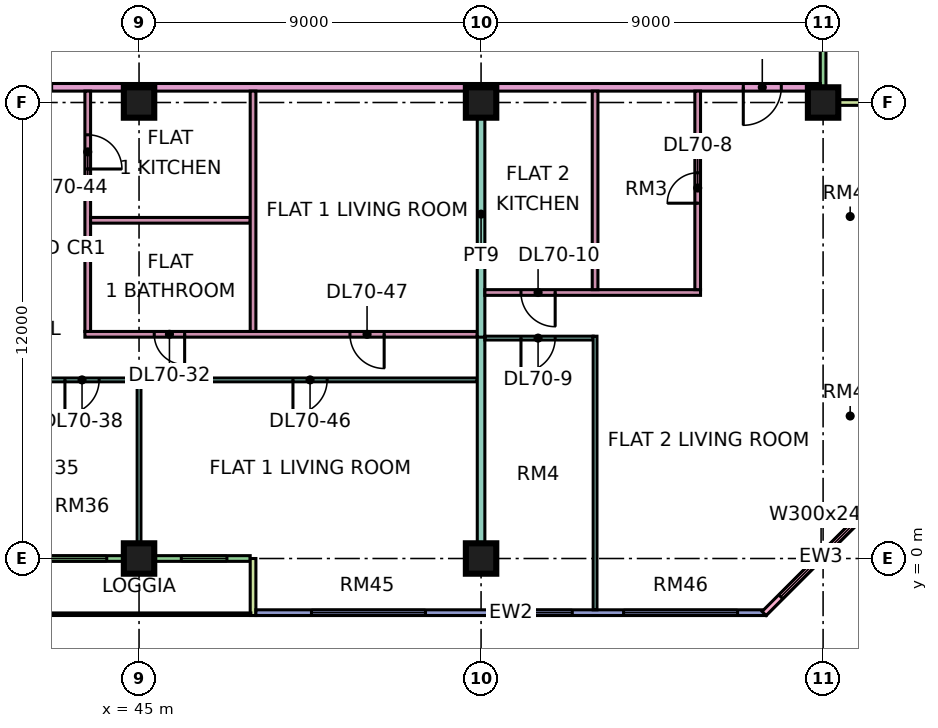
"""IFC4 building model, lengths in metres.
Left out: names, types, materials, properties, quantities, classifications, styles, units other than length and angle.
Written with IfcOpenShell. Run it as: python <this file> out.ifc"""

import sys

from ifc_helpers import new_model, si_unit, direction, frame, frame_2d, origin, origin_2d, place, context, subcontext, project, spatial, rectangle, extrude, element, fill, save


model = new_model("IFC4")
c1 = context("Model", 3, precision=1e-05, world=origin(), true_north=direction((0.0, 1.0)))
c2 = subcontext(c1, "Body", "Model", "MODEL_VIEW")
j1 = project(units=[si_unit("LENGTHUNIT", "METRE"), si_unit("PLANEANGLEUNIT", "RADIAN")], contexts=[c1])
p1 = place(None, origin())
s1 = spatial("IfcSite", under=j1, at=p1, CompositionType="ELEMENT")
p2 = place(p1, origin())
s2 = spatial("IfcBuilding", under=s1, at=p2, CompositionType="ELEMENT")
p3 = place(p2, frame((0.0, 0.0, 299.65)))
s3 = spatial("IfcBuildingStorey", under=s2, at=p3, CompositionType="ELEMENT", Elevation=299.65)
for number, where, z_axis, x_axis in (
    (1, (45.0, 0.0, 0.0), (0.0, 0.0, 1.0), (1.0, 0.0, 0.0)),
    (2, (45.0, 12.0, 0.0), (0.0, 0.0, 1.0), (1.0, 0.0, 0.0)),
    (3, (54.0, 0.0, 0.0), (0.0, 0.0, 1.0), (1.0, 0.0, 0.0)),
    (4, (54.0, 12.0, 0.0), (0.0, 0.0, 1.0), (1.0, 0.0, 0.0)),
    (5, (63.0, 12.0, 0.0), (0.0, 0.0, 1.0), (1.0, 0.0, 0.0)),
):
    element("IfcColumn", number, at=place(p3, frame(where, z_axis=z_axis, x_axis=x_axis)), inside=s3, PredefinedType="COLUMN", context=c2, shape_type="SweptSolid", body=[
        extrude(rectangle(XDim=0.8, YDim=0.8, at=origin_2d()), origin(), (0.0, 0.0, 1.0), 3.75),
    ])
p4 = place(p3, frame((36.075, 0.0, 0.0), z_axis=(0.0, 0.0, 1.0), x_axis=(1.0, 0.0, 0.0)))
e6 = element("IfcWall", 6, at=p4, inside=s3, PredefinedType="SOLIDWALL", context=c2, shape_type="SweptSolid", body=[
    extrude(rectangle(XDim=11.85, YDim=0.15, at=frame_2d((5.925, 0.0))), origin(), (0.0, 0.0, 1.0), 3.35),
])
p5 = place(p4, frame((0.775, 0.0, 0.45)))
e7 = element("IfcOpeningElement", 7, at=p5, cuts=e6, PredefinedType="OPENING", context=c2, shape_type="SweptSolid", body=[
    extrude(rectangle(XDim=1.8, YDim=2.4, at=frame_2d((0.9, 1.2))), frame((0.0, 0.085, 0.0), z_axis=(0.0, -1.0, 0.0), x_axis=(1.0, 0.0, 0.0)), (0.0, 0.0, 1.0), 0.17),
])
p6 = place(p4, frame((3.525, 0.0, 0.0)))
e8 = element("IfcOpeningElement", 8, at=p6, cuts=e6, PredefinedType="OPENING", context=c2, shape_type="SweptSolid", body=[
    extrude(rectangle(XDim=1.8, YDim=2.4, at=frame_2d((0.9, 1.2))), frame((0.0, 0.085, 0.0), z_axis=(0.0, -1.0, 0.0), x_axis=(1.0, 0.0, 0.0)), (0.0, 0.0, 1.0), 0.17),
])
p7 = place(p4, frame((6.275, 0.0, 0.45)))
e9 = element("IfcOpeningElement", 9, at=p7, cuts=e6, PredefinedType="OPENING", context=c2, shape_type="SweptSolid", body=[
    extrude(rectangle(XDim=1.8, YDim=2.4, at=frame_2d((0.9, 1.2))), frame((0.0, 0.085, 0.0), z_axis=(0.0, -1.0, 0.0), x_axis=(1.0, 0.0, 0.0)), (0.0, 0.0, 1.0), 0.17),
])
p8 = place(p4, frame((10.038, 0.0, 0.45)))
e10 = element("IfcOpeningElement", 10, at=p8, cuts=e6, PredefinedType="OPENING", context=c2, shape_type="SweptSolid", body=[
    extrude(rectangle(XDim=1.2, YDim=2.4, at=frame_2d((0.6, 1.2))), frame((0.0, 0.085, 0.0), z_axis=(0.0, -1.0, 0.0), x_axis=(1.0, 0.0, 0.0)), (0.0, 0.0, 1.0), 0.17),
])
p9 = place(p3, frame((48.0, -1.5, 0.0), z_axis=(0.0, 0.0, 1.0), x_axis=(0.0, 1.0, 0.0)))
e11 = element("IfcWall", 11, at=p9, inside=s3, PredefinedType="SOLIDWALL", context=c2, shape_type="SweptSolid", body=[
    extrude(rectangle(XDim=1.5, YDim=0.15, at=frame_2d((0.75, 0.0))), origin(), (0.0, 0.0, 1.0), 3.35),
])
p10 = place(p3, frame((48.075, -1.425, 0.0), z_axis=(0.0, 0.0, 1.0), x_axis=(1.0, 0.0, 0.0)))
e12 = element("IfcWall", 12, at=p10, inside=s3, PredefinedType="SOLIDWALL", context=c2, shape_type="SweptSolid", body=[
    extrude(rectangle(XDim=13.425, YDim=0.15, at=frame_2d((6.712, 0.0))), origin(), (0.0, 0.0, 1.0), 3.35),
])
p11 = place(p10, frame((1.462, 0.0, 0.45)))
e13 = element("IfcOpeningElement", 13, at=p11, cuts=e12, PredefinedType="OPENING", context=c2, shape_type="SweptSolid", body=[
    extrude(rectangle(XDim=3.0, YDim=2.4, at=frame_2d((1.5, 1.2))), frame((0.0, 0.085, 0.0), z_axis=(0.0, -1.0, 0.0), x_axis=(1.0, 0.0, 0.0)), (0.0, 0.0, 1.0), 0.17),
])
p12 = place(p10, frame((6.525, 0.0, 0.45)))
e14 = element("IfcOpeningElement", 14, at=p12, cuts=e12, PredefinedType="OPENING", context=c2, shape_type="SweptSolid", body=[
    extrude(rectangle(XDim=1.8, YDim=2.4, at=frame_2d((0.9, 1.2))), frame((0.0, 0.085, 0.0), z_axis=(0.0, -1.0, 0.0), x_axis=(1.0, 0.0, 0.0)), (0.0, 0.0, 1.0), 0.17),
])
p13 = place(p10, frame((9.675, 0.0, 0.45)))
e15 = element("IfcOpeningElement", 15, at=p13, cuts=e12, PredefinedType="OPENING", context=c2, shape_type="SweptSolid", body=[
    extrude(rectangle(XDim=3.0, YDim=2.4, at=frame_2d((1.5, 1.2))), frame((0.0, 0.085, 0.0), z_axis=(0.0, -1.0, 0.0), x_axis=(1.0, 0.0, 0.0)), (0.0, 0.0, 1.0), 0.17),
])
p14 = place(p3, frame((61.447, -1.447, 0.0), z_axis=(0.0, 0.0, 1.0), x_axis=(0.707106781187, 0.707106781187, 0.0)))
e16 = element("IfcWall", 16, at=p14, inside=s3, PredefinedType="SOLIDWALL", context=c2, shape_type="SweptSolid", body=[
    extrude(rectangle(XDim=4.243, YDim=0.15, at=frame_2d((2.121, 0.0))), origin(), (0.0, 0.0, 1.0), 3.35),
])
p15 = place(p14, frame((0.621, 0.0, 0.45)))
e17 = element("IfcOpeningElement", 17, at=p15, cuts=e16, PredefinedType="OPENING", context=c2, shape_type="SweptSolid", body=[
    extrude(rectangle(XDim=3.0, YDim=2.4, at=frame_2d((1.5, 1.2))), frame((0.0, 0.085, 0.0), z_axis=(0.0, -1.0, 0.0), x_axis=(1.0, 0.0, 0.0)), (0.0, 0.0, 1.0), 0.17),
])
p16 = place(p3, frame((63.0, 12.075, 0.0), z_axis=(0.0, 0.0, 1.0), x_axis=(0.0, 1.0, 0.0)))
e18 = element("IfcWall", 18, at=p16, inside=s3, PredefinedType="SOLIDWALL", context=c2, shape_type="SweptSolid", body=[
    extrude(rectangle(XDim=10.35, YDim=0.15, at=frame_2d((5.175, 0.0))), origin(), (0.0, 0.0, 1.0), 3.35),
])
p17 = place(p16, frame((6.038, 0.0, 0.0)))
e19 = element("IfcOpeningElement", 19, at=p17, cuts=e18, PredefinedType="OPENING", context=c2, shape_type="SweptSolid", body=[
    extrude(rectangle(XDim=1.8, YDim=2.4, at=frame_2d((0.9, 1.2))), frame((0.0, 0.085, 0.0), z_axis=(0.0, -1.0, 0.0), x_axis=(1.0, 0.0, 0.0)), (0.0, 0.0, 1.0), 0.17),
])
p18 = place(p3, frame((64.5, 12.0, 0.0), z_axis=(0.0, 0.0, 1.0), x_axis=(-1.0, 0.0, 0.0)))
e20 = element("IfcWall", 20, at=p18, inside=s3, PredefinedType="SOLIDWALL", context=c2, shape_type="SweptSolid", body=[
    extrude(rectangle(XDim=1.5, YDim=0.15, at=frame_2d((0.75, 0.0))), origin(), (0.0, 0.0, 1.0), 3.35),
])
p19 = place(p3, frame((33.05, 4.7, 0.0), z_axis=(0.0, 0.0, 1.0), x_axis=(1.0, 0.0, 0.0)))
e21 = element("IfcWall", 21, at=p19, inside=s3, PredefinedType="PARTITIONING", context=c2, shape_type="SweptSolid", body=[
    extrude(rectangle(XDim=20.85, YDim=0.1, at=frame_2d((10.425, 0.0))), origin(), (0.0, 0.0, 1.0), 3.35),
])
p20 = place(p19, frame((1.0, 0.0, 0.0)))
e22 = element("IfcOpeningElement", 22, at=p20, cuts=e21, PredefinedType="OPENING", context=c2, shape_type="SweptSolid", body=[
    extrude(rectangle(XDim=0.9, YDim=2.1, at=frame_2d((0.45, 1.05))), frame((0.0, 0.06, 0.0), z_axis=(0.0, -1.0, 0.0), x_axis=(1.0, 0.0, 0.0)), (0.0, 0.0, 1.0), 0.12),
])
p21 = place(p19, frame((4.0, 0.0, 0.0)))
e23 = element("IfcOpeningElement", 23, at=p21, cuts=e21, PredefinedType="OPENING", context=c2, shape_type="SweptSolid", body=[
    extrude(rectangle(XDim=0.9, YDim=2.1, at=frame_2d((0.45, 1.05))), frame((0.0, 0.06, 0.0), z_axis=(0.0, -1.0, 0.0), x_axis=(1.0, 0.0, 0.0)), (0.0, 0.0, 1.0), 0.12),
])
p22 = place(p19, frame((7.0, 0.0, 0.0)))
e24 = element("IfcOpeningElement", 24, at=p22, cuts=e21, PredefinedType="OPENING", context=c2, shape_type="SweptSolid", body=[
    extrude(rectangle(XDim=0.9, YDim=2.1, at=frame_2d((0.45, 1.05))), frame((0.0, 0.06, 0.0), z_axis=(0.0, -1.0, 0.0), x_axis=(1.0, 0.0, 0.0)), (0.0, 0.0, 1.0), 0.12),
])
p23 = place(p19, frame((10.0, 0.0, 0.0)))
e25 = element("IfcOpeningElement", 25, at=p23, cuts=e21, PredefinedType="OPENING", context=c2, shape_type="SweptSolid", body=[
    extrude(rectangle(XDim=0.9, YDim=2.1, at=frame_2d((0.45, 1.05))), frame((0.0, 0.06, 0.0), z_axis=(0.0, -1.0, 0.0), x_axis=(1.0, 0.0, 0.0)), (0.0, 0.0, 1.0), 0.12),
])
p24 = place(p19, frame((16.0, 0.0, 0.0)))
e26 = element("IfcOpeningElement", 26, at=p24, cuts=e21, PredefinedType="OPENING", context=c2, shape_type="SweptSolid", body=[
    extrude(rectangle(XDim=0.9, YDim=2.1, at=frame_2d((0.45, 1.05))), frame((0.0, 0.06, 0.0), z_axis=(0.0, -1.0, 0.0), x_axis=(1.0, 0.0, 0.0)), (0.0, 0.0, 1.0), 0.12),
])
p25 = place(p3, frame((40.65, 12.4, 0.0), z_axis=(0.0, 0.0, 1.0), x_axis=(1.0, 0.0, 0.0)))
e27 = element("IfcWall", 27, at=p25, inside=s3, PredefinedType="PARTITIONING", context=c2, shape_type="SweptSolid", body=[
    extrude(rectangle(XDim=22.276, YDim=0.2, at=frame_2d((11.138, 0.0))), origin(), (0.0, 0.0, 1.0), 3.35),
])
p26 = place(p25, frame((20.25, 0.0, 0.0)))
e28 = element("IfcOpeningElement", 28, at=p26, cuts=e27, PredefinedType="OPENING", context=c2, shape_type="SweptSolid", body=[
    extrude(rectangle(XDim=1.0, YDim=2.1, at=frame_2d((0.5, 1.05))), frame((0.0, 0.11, 0.0), z_axis=(0.0, -1.0, 0.0), x_axis=(1.0, 0.0, 0.0)), (0.0, 0.0, 1.0), 0.22),
])
p27 = place(p25, frame((1.05, 0.0, 0.0)))
e29 = element("IfcOpeningElement", 29, at=p27, cuts=e27, PredefinedType="OPENING", context=c2, shape_type="SweptSolid", body=[
    extrude(rectangle(XDim=1.0, YDim=2.1, at=frame_2d((0.5, 1.05))), frame((0.0, 0.11, 0.0), z_axis=(0.0, -1.0, 0.0), x_axis=(1.0, 0.0, 0.0)), (0.0, 0.0, 1.0), 0.22),
])
p28 = place(p3, frame((43.575, 5.9, 0.0), z_axis=(0.0, 0.0, 1.0), x_axis=(1.0, 0.0, 0.0)))
e30 = element("IfcWall", 30, at=p28, inside=s3, PredefinedType="PARTITIONING", context=c2, shape_type="SweptSolid", body=[
    extrude(rectangle(XDim=10.325, YDim=0.15, at=frame_2d((5.163, 0.0))), origin(), (0.0, 0.0, 1.0), 3.35),
])
p29 = place(p28, frame((1.825, 0.0, 0.0)))
e31 = element("IfcOpeningElement", 31, at=p29, cuts=e30, PredefinedType="OPENING", context=c2, shape_type="SweptSolid", body=[
    extrude(rectangle(XDim=0.8, YDim=2.1, at=frame_2d((0.4, 1.05))), frame((0.0, 0.085, 0.0), z_axis=(0.0, -1.0, 0.0), x_axis=(1.0, 0.0, 0.0)), (0.0, 0.0, 1.0), 0.17),
])
p30 = place(p28, frame((6.975, 0.0, 0.0)))
e32 = element("IfcOpeningElement", 32, at=p30, cuts=e30, PredefinedType="OPENING", context=c2, shape_type="SweptSolid", body=[
    extrude(rectangle(XDim=0.9, YDim=2.1, at=frame_2d((0.45, 1.05))), frame((0.0, 0.085, 0.0), z_axis=(0.0, -1.0, 0.0), x_axis=(1.0, 0.0, 0.0)), (0.0, 0.0, 1.0), 0.17),
])
p31 = place(p3, frame((43.65, 5.975, 0.0), z_axis=(0.0, 0.0, 1.0), x_axis=(0.0, 1.0, 0.0)))
e33 = element("IfcWall", 33, at=p31, inside=s3, PredefinedType="PARTITIONING", context=c2, shape_type="SweptSolid", body=[
    extrude(rectangle(XDim=6.325, YDim=0.15, at=frame_2d((3.163, 0.0))), origin(), (0.0, 0.0, 1.0), 3.35),
])
p32 = place(p31, frame((4.275, 0.0, 0.0)))
e34 = element("IfcOpeningElement", 34, at=p32, cuts=e33, PredefinedType="OPENING", context=c2, shape_type="SweptSolid", body=[
    extrude(rectangle(XDim=0.9, YDim=2.1, at=frame_2d((0.45, 1.05))), frame((0.0, 0.085, 0.0), z_axis=(0.0, -1.0, 0.0), x_axis=(1.0, 0.0, 0.0)), (0.0, 0.0, 1.0), 0.17),
])
p33 = place(p3, frame((43.725, 8.9, 0.0), z_axis=(0.0, 0.0, 1.0), x_axis=(1.0, 0.0, 0.0)))
e35 = element("IfcWall", 35, at=p33, inside=s3, PredefinedType="PARTITIONING", context=c2, shape_type="SweptSolid", body=[
    extrude(rectangle(XDim=4.2, YDim=0.15, at=frame_2d((2.1, 0.0))), origin(), (0.0, 0.0, 1.0), 3.35),
])
p34 = place(p3, frame((45.0, 0.074, 0.0), z_axis=(0.0, 0.0, 1.0), x_axis=(0.0, 1.0, 0.0)))
e36 = element("IfcWall", 36, at=p34, inside=s3, PredefinedType="PARTITIONING", context=c2, shape_type="SweptSolid", body=[
    extrude(rectangle(XDim=4.576, YDim=0.1, at=frame_2d((2.288, 0.0))), origin(), (0.0, 0.0, 1.0), 3.35),
])
p35 = place(p3, frame((48.0, 5.975, 0.0), z_axis=(0.0, 0.0, 1.0), x_axis=(0.0, 1.0, 0.0)))
e37 = element("IfcWall", 37, at=p35, inside=s3, PredefinedType="PARTITIONING", context=c2, shape_type="SweptSolid", body=[
    extrude(rectangle(XDim=6.325, YDim=0.15, at=frame_2d((3.163, 0.0))), origin(), (0.0, 0.0, 1.0), 3.35),
])
p36 = place(p3, frame((54.0, 0.0, 0.0), z_axis=(0.0, 0.0, 1.0), x_axis=(0.0, 1.0, 0.0)))
e38 = element("IfcWall", 38, at=p36, inside=s3, PredefinedType="PARTITIONING", context=c2, shape_type="SweptSolid", body=[
    extrude(rectangle(XDim=5.85, YDim=0.2, at=frame_2d((2.925, 0.0))), origin(), (0.0, 0.0, 1.0), 3.35),
])
p37 = place(p3, frame((54.0, 5.825, 0.0), z_axis=(0.0, 0.0, 1.0), x_axis=(0.0, 1.0, 0.0)))
e39 = element("IfcWall", 39, at=p37, inside=s3, PredefinedType="PARTITIONING", context=c2, shape_type="SweptSolid", body=[
    extrude(rectangle(XDim=6.475, YDim=0.2, at=frame_2d((3.238, 0.0))), origin(), (0.0, 0.0, 1.0), 3.35),
])
p38 = place(p3, frame((54.1, 5.8, 0.0), z_axis=(0.0, 0.0, 1.0), x_axis=(1.0, 0.0, 0.0)))
e40 = element("IfcWall", 40, at=p38, inside=s3, PredefinedType="PARTITIONING", context=c2, shape_type="SweptSolid", body=[
    extrude(rectangle(XDim=2.85, YDim=0.1, at=frame_2d((1.425, 0.0))), origin(), (0.0, 0.0, 1.0), 3.35),
])
p39 = place(p38, frame((0.95, 0.0, 0.0)))
e41 = element("IfcOpeningElement", 41, at=p39, cuts=e40, PredefinedType="OPENING", context=c2, shape_type="SweptSolid", body=[
    extrude(rectangle(XDim=0.9, YDim=2.1, at=frame_2d((0.45, 1.05))), frame((0.0, 0.06, 0.0), z_axis=(0.0, -1.0, 0.0), x_axis=(1.0, 0.0, 0.0)), (0.0, 0.0, 1.0), 0.12),
])
p40 = place(p3, frame((54.1, 7.0, 0.0), z_axis=(0.0, 0.0, 1.0), x_axis=(1.0, 0.0, 0.0)))
e42 = element("IfcWall", 42, at=p40, inside=s3, PredefinedType="PARTITIONING", context=c2, shape_type="SweptSolid", body=[
    extrude(rectangle(XDim=5.675, YDim=0.15, at=frame_2d((2.837, 0.0))), origin(), (0.0, 0.0, 1.0), 3.35),
])
p41 = place(p40, frame((0.95, 0.0, 0.0)))
e43 = element("IfcOpeningElement", 43, at=p41, cuts=e42, PredefinedType="OPENING", context=c2, shape_type="SweptSolid", body=[
    extrude(rectangle(XDim=0.9, YDim=2.1, at=frame_2d((0.45, 1.05))), frame((0.0, 0.085, 0.0), z_axis=(0.0, -1.0, 0.0), x_axis=(1.0, 0.0, 0.0)), (0.0, 0.0, 1.0), 0.17),
])
p42 = place(p3, frame((57.0, -1.35, 0.0), z_axis=(0.0, 0.0, 1.0), x_axis=(0.0, 1.0, 0.0)))
e44 = element("IfcWall", 44, at=p42, inside=s3, PredefinedType="PARTITIONING", context=c2, shape_type="SweptSolid", body=[
    extrude(rectangle(XDim=7.2, YDim=0.1, at=frame_2d((3.6, 0.0))), origin(), (0.0, 0.0, 1.0), 3.35),
])
p43 = place(p3, frame((57.0, 7.075, 0.0), z_axis=(0.0, 0.0, 1.0), x_axis=(0.0, 1.0, 0.0)))
e45 = element("IfcWall", 45, at=p43, inside=s3, PredefinedType="PARTITIONING", context=c2, shape_type="SweptSolid", body=[
    extrude(rectangle(XDim=5.225, YDim=0.15, at=frame_2d((2.613, 0.0))), origin(), (0.0, 0.0, 1.0), 3.35),
])
p44 = place(p3, frame((59.7, 7.075, 0.0), z_axis=(0.0, 0.0, 1.0), x_axis=(0.0, 1.0, 0.0)))
e46 = element("IfcWall", 46, at=p44, inside=s3, PredefinedType="PARTITIONING", context=c2, shape_type="SweptSolid", body=[
    extrude(rectangle(XDim=5.225, YDim=0.15, at=frame_2d((2.613, 0.0))), origin(), (0.0, 0.0, 1.0), 3.35),
])
p45 = place(p44, frame((2.275, 0.0, 0.0)))
e47 = element("IfcOpeningElement", 47, at=p45, cuts=e46, PredefinedType="OPENING", context=c2, shape_type="SweptSolid", body=[
    extrude(rectangle(XDim=0.8, YDim=2.1, at=frame_2d((0.4, 1.05))), frame((0.0, 0.085, 0.0), z_axis=(0.0, -1.0, 0.0), x_axis=(1.0, 0.0, 0.0)), (0.0, 0.0, 1.0), 0.17),
])
p46 = place(p7, origin())
e48 = element("IfcWindow", 48, at=p46, inside=s3, PartitioningType="SINGLE_PANEL", PredefinedType="WINDOW", context=c2, shape_type="SweptSolid", body=[
    extrude(rectangle(XDim=1.8, YDim=2.4, at=frame_2d((0.9, 1.2))), frame((0.0, 0.03, 0.0), z_axis=(0.0, -1.0, 0.0), x_axis=(1.0, 0.0, 0.0)), (0.0, 0.0, 1.0), 0.06),
])
fill(e9, e48)
p47 = place(p8, origin())
e49 = element("IfcWindow", 49, at=p47, inside=s3, PartitioningType="SINGLE_PANEL", PredefinedType="WINDOW", context=c2, shape_type="SweptSolid", body=[
    extrude(rectangle(XDim=1.2, YDim=2.4, at=frame_2d((0.6, 1.2))), frame((0.0, 0.03, 0.0), z_axis=(0.0, -1.0, 0.0), x_axis=(1.0, 0.0, 0.0)), (0.0, 0.0, 1.0), 0.06),
])
fill(e10, e49)
p48 = place(p11, origin())
e50 = element("IfcWindow", 50, at=p48, inside=s3, PartitioningType="SINGLE_PANEL", PredefinedType="WINDOW", context=c2, shape_type="SweptSolid", body=[
    extrude(rectangle(XDim=3.0, YDim=2.4, at=frame_2d((1.5, 1.2))), frame((0.0, 0.03, 0.0), z_axis=(0.0, -1.0, 0.0), x_axis=(1.0, 0.0, 0.0)), (0.0, 0.0, 1.0), 0.06),
])
fill(e13, e50)
p49 = place(p12, origin())
e51 = element("IfcWindow", 51, at=p49, inside=s3, PartitioningType="SINGLE_PANEL", PredefinedType="WINDOW", context=c2, shape_type="SweptSolid", body=[
    extrude(rectangle(XDim=1.8, YDim=2.4, at=frame_2d((0.9, 1.2))), frame((0.0, 0.03, 0.0), z_axis=(0.0, -1.0, 0.0), x_axis=(1.0, 0.0, 0.0)), (0.0, 0.0, 1.0), 0.06),
])
fill(e14, e51)
p50 = place(p13, origin())
e52 = element("IfcWindow", 52, at=p50, inside=s3, PartitioningType="SINGLE_PANEL", PredefinedType="WINDOW", context=c2, shape_type="SweptSolid", body=[
    extrude(rectangle(XDim=3.0, YDim=2.4, at=frame_2d((1.5, 1.2))), frame((0.0, 0.03, 0.0), z_axis=(0.0, -1.0, 0.0), x_axis=(1.0, 0.0, 0.0)), (0.0, 0.0, 1.0), 0.06),
])
fill(e15, e52)
p51 = place(p15, origin())
e53 = element("IfcWindow", 53, at=p51, inside=s3, PartitioningType="SINGLE_PANEL", PredefinedType="WINDOW", context=c2, shape_type="SweptSolid", body=[
    extrude(rectangle(XDim=3.0, YDim=2.4, at=frame_2d((1.5, 1.2))), frame((0.0, 0.03, 0.0), z_axis=(0.0, -1.0, 0.0), x_axis=(1.0, 0.0, 0.0)), (0.0, 0.0, 1.0), 0.06),
])
fill(e17, e53)
p52 = place(p45, origin())
e54 = element("IfcDoor", 54, at=p52, inside=s3, OperationType="SINGLE_SWING_LEFT", PredefinedType="DOOR", context=c2, shape_type="SweptSolid", body=[
    extrude(rectangle(XDim=0.8, YDim=2.1, at=frame_2d((0.4, 1.05))), frame((0.0, 0.025, 0.0), z_axis=(0.0, -1.0, 0.0), x_axis=(1.0, 0.0, 0.0)), (0.0, 0.0, 1.0), 0.05),
])
fill(e47, e54)
p53 = place(p39, frame((0.9, 0.0, 0.0), z_axis=(0.0, 0.0, 1.0), x_axis=(-1.0, 0.0, 0.0)))
e55 = element("IfcDoor", 55, at=p53, inside=s3, OperationType="SINGLE_SWING_LEFT", PredefinedType="DOOR", context=c2, shape_type="SweptSolid", body=[
    extrude(rectangle(XDim=0.9, YDim=2.1, at=frame_2d((0.45, 1.05))), frame((0.0, 0.025, 0.0), z_axis=(0.0, -1.0, 0.0), x_axis=(1.0, 0.0, 0.0)), (0.0, 0.0, 1.0), 0.05),
])
fill(e41, e55)
p54 = place(p41, origin())
e56 = element("IfcDoor", 56, at=p54, inside=s3, OperationType="SINGLE_SWING_RIGHT", PredefinedType="DOOR", context=c2, shape_type="SweptSolid", body=[
    extrude(rectangle(XDim=0.9, YDim=2.1, at=frame_2d((0.45, 1.05))), frame((0.0, 0.025, 0.0), z_axis=(0.0, -1.0, 0.0), x_axis=(1.0, 0.0, 0.0)), (0.0, 0.0, 1.0), 0.05),
])
fill(e43, e56)
p55 = place(p26, frame((1.0, 0.0, 0.0), z_axis=(0.0, 0.0, 1.0), x_axis=(-1.0, 0.0, 0.0)))
e57 = element("IfcDoor", 57, at=p55, inside=s3, OperationType="SINGLE_SWING_LEFT", PredefinedType="DOOR", context=c2, shape_type="SweptSolid", body=[
    extrude(rectangle(XDim=1.0, YDim=2.1, at=frame_2d((0.5, 1.05))), frame((0.0, 0.025, 0.0), z_axis=(0.0, -1.0, 0.0), x_axis=(1.0, 0.0, 0.0)), (0.0, 0.0, 1.0), 0.05),
])
fill(e28, e57)
p56 = place(p29, origin())
e58 = element("IfcDoor", 58, at=p56, inside=s3, OperationType="SINGLE_SWING_RIGHT", PredefinedType="DOOR", context=c2, shape_type="SweptSolid", body=[
    extrude(rectangle(XDim=0.8, YDim=2.1, at=frame_2d((0.4, 1.05))), frame((0.0, 0.025, 0.0), z_axis=(0.0, -1.0, 0.0), x_axis=(1.0, 0.0, 0.0)), (0.0, 0.0, 1.0), 0.05),
])
fill(e31, e58)
p57 = place(p23, frame((0.9, 0.0, 0.0), z_axis=(0.0, 0.0, 1.0), x_axis=(-1.0, 0.0, 0.0)))
e59 = element("IfcDoor", 59, at=p57, inside=s3, OperationType="SINGLE_SWING_LEFT", PredefinedType="DOOR", context=c2, shape_type="SweptSolid", body=[
    extrude(rectangle(XDim=0.9, YDim=2.1, at=frame_2d((0.45, 1.05))), frame((0.0, 0.025, 0.0), z_axis=(0.0, -1.0, 0.0), x_axis=(1.0, 0.0, 0.0)), (0.0, 0.0, 1.0), 0.05),
])
fill(e25, e59)
p58 = place(p32, frame((0.9, 0.0, 0.0), z_axis=(0.0, 0.0, 1.0), x_axis=(-1.0, 0.0, 0.0)))
e60 = element("IfcDoor", 60, at=p58, inside=s3, OperationType="SINGLE_SWING_LEFT", PredefinedType="DOOR", context=c2, shape_type="SweptSolid", body=[
    extrude(rectangle(XDim=0.9, YDim=2.1, at=frame_2d((0.45, 1.05))), frame((0.0, 0.025, 0.0), z_axis=(0.0, -1.0, 0.0), x_axis=(1.0, 0.0, 0.0)), (0.0, 0.0, 1.0), 0.05),
])
fill(e34, e60)
p59 = place(p24, frame((0.9, 0.0, 0.0), z_axis=(0.0, 0.0, 1.0), x_axis=(-1.0, 0.0, 0.0)))
e61 = element("IfcDoor", 61, at=p59, inside=s3, OperationType="SINGLE_SWING_LEFT", PredefinedType="DOOR", context=c2, shape_type="SweptSolid", body=[
    extrude(rectangle(XDim=0.9, YDim=2.1, at=frame_2d((0.45, 1.05))), frame((0.0, 0.025, 0.0), z_axis=(0.0, -1.0, 0.0), x_axis=(1.0, 0.0, 0.0)), (0.0, 0.0, 1.0), 0.05),
])
fill(e26, e61)
p60 = place(p30, origin())
e62 = element("IfcDoor", 62, at=p60, inside=s3, OperationType="SINGLE_SWING_RIGHT", PredefinedType="DOOR", context=c2, shape_type="SweptSolid", body=[
    extrude(rectangle(XDim=0.9, YDim=2.1, at=frame_2d((0.45, 1.05))), frame((0.0, 0.025, 0.0), z_axis=(0.0, -1.0, 0.0), x_axis=(1.0, 0.0, 0.0)), (0.0, 0.0, 1.0), 0.05),
])
fill(e32, e62)
save(model, sys.argv[1])
